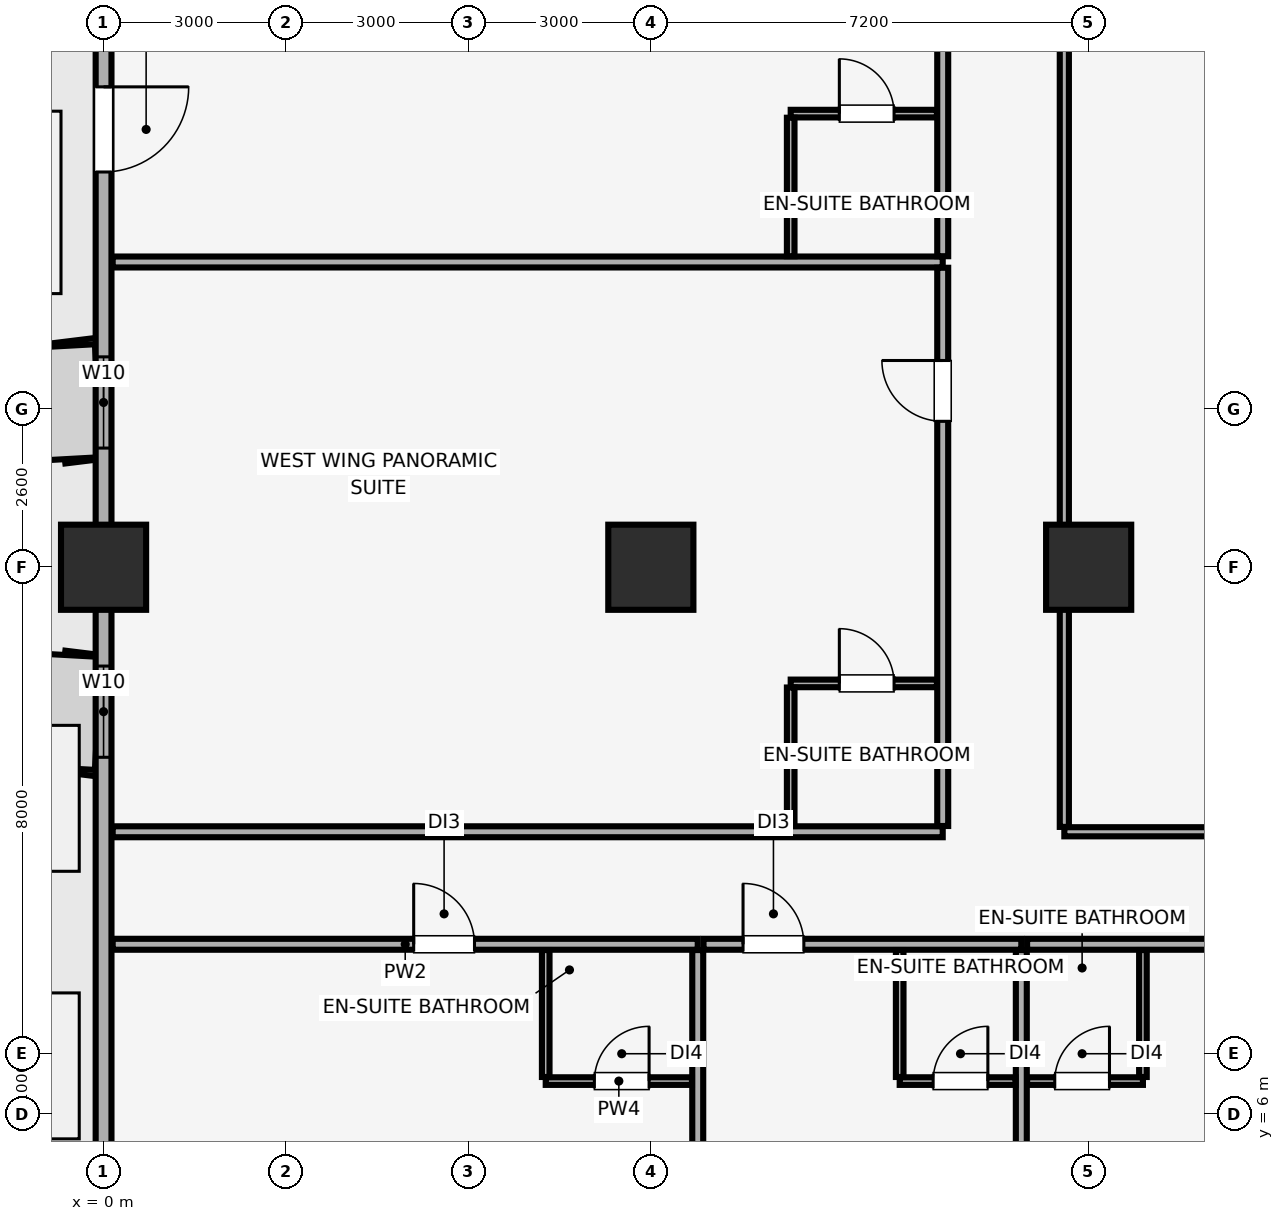
"""IFC4 building model, lengths in metres.
Left out: names, types, materials, properties, quantities, classifications, styles, units other than length and angle.
Written with IfcOpenShell. Run it as: python <this file> out.ifc"""

import sys

from ifc_helpers import new_model, si_unit, direction, frame, frame_2d, origin, origin_2d, place, context, subcontext, project, spatial, rectangle, extrude, element, fill, save


model = new_model("IFC4")
c1 = context("Model", 3, precision=1e-05, world=origin(), true_north=direction((0.0, 1.0)))
c2 = subcontext(c1, "Body", "Model", "MODEL_VIEW")
j1 = project(units=[si_unit("LENGTHUNIT", "METRE"), si_unit("PLANEANGLEUNIT", "RADIAN")], contexts=[c1])
p1 = place(None, origin())
s1 = spatial("IfcSite", under=j1, at=p1, CompositionType="ELEMENT")
p2 = place(p1, origin())
s2 = spatial("IfcBuilding", under=s1, at=p2, CompositionType="ELEMENT")
p3 = place(p2, frame((0.0, 0.0, 31.4)))
s3 = spatial("IfcBuildingStorey", under=s2, at=p3, CompositionType="ELEMENT", Elevation=31.4)
for number, where, z_axis, x_axis in (
    (1, (0.0, 15.0, 0.0), (0.0, 0.0, 1.0), (1.0, 0.0, 0.0)),
    (2, (9.0, 15.0, 0.0), (0.0, 0.0, 1.0), (1.0, 0.0, 0.0)),
    (3, (16.2, 15.0, 0.0), (0.0, 0.0, 1.0), (1.0, 0.0, 0.0)),
):
    element("IfcColumn", number, at=place(p3, frame(where, z_axis=z_axis, x_axis=x_axis)), inside=s3, PredefinedType="COLUMN", context=c2, shape_type="SweptSolid", body=[
        extrude(rectangle(XDim=1.4, YDim=1.4, at=origin_2d()), origin(), (0.0, 0.0, 1.0), 3.51),
    ])
p4 = place(p3, frame((0.0, 44.8, 0.0), z_axis=(0.0, 0.0, 1.0), x_axis=(0.0, -1.0, 0.0)))
e4 = element("IfcWall", 4, at=p4, inside=s3, PredefinedType="SOLIDWALL", context=c2, shape_type="SweptSolid", body=[
    extrude(rectangle(XDim=40.6, YDim=0.26, at=frame_2d((20.3, 0.0))), origin(), (0.0, 0.0, 1.0), 2.56),
])
p5 = place(p4, frame((21.9, 0.0, 0.0)))
e5 = element("IfcOpeningElement", 5, at=p5, cuts=e4, PredefinedType="OPENING", context=c2, shape_type="SweptSolid", body=[
    extrude(rectangle(XDim=1.4, YDim=2.2, at=frame_2d((0.7, 1.1))), frame((0.0, 0.14, 0.0), z_axis=(0.0, -1.0, 0.0), x_axis=(1.0, 0.0, 0.0)), (0.0, 0.0, 1.0), 0.28),
])
p6 = place(p4, frame((31.425, 0.0, 0.85)))
e6 = element("IfcOpeningElement", 6, at=p6, cuts=e4, PredefinedType="OPENING", context=c2, shape_type="SweptSolid", body=[
    extrude(rectangle(XDim=1.5, YDim=1.4, at=frame_2d((0.75, 0.7))), frame((0.0, 0.14, 0.0), z_axis=(0.0, -1.0, 0.0), x_axis=(1.0, 0.0, 0.0)), (0.0, 0.0, 1.0), 0.28),
])
p7 = place(p4, frame((26.34, 0.0, 0.85)))
e7 = element("IfcOpeningElement", 7, at=p7, cuts=e4, PredefinedType="OPENING", context=c2, shape_type="SweptSolid", body=[
    extrude(rectangle(XDim=1.5, YDim=1.4, at=frame_2d((0.75, 0.7))), frame((0.0, 0.14, 0.0), z_axis=(0.0, -1.0, 0.0), x_axis=(1.0, 0.0, 0.0)), (0.0, 0.0, 1.0), 0.28),
])
p8 = place(p4, frame((17.99, 0.0, 0.85)))
e8 = element("IfcOpeningElement", 8, at=p8, cuts=e4, PredefinedType="OPENING", context=c2, shape_type="SweptSolid", body=[
    extrude(rectangle(XDim=1.5, YDim=1.4, at=frame_2d((0.75, 0.7))), frame((0.0, 0.14, 0.0), z_axis=(0.0, -1.0, 0.0), x_axis=(1.0, 0.0, 0.0)), (0.0, 0.0, 1.0), 0.28),
])
p9 = place(p4, frame((11.05, 0.0, 0.85)))
e9 = element("IfcOpeningElement", 9, at=p9, cuts=e4, PredefinedType="OPENING", context=c2, shape_type="SweptSolid", body=[
    extrude(rectangle(XDim=1.5, YDim=1.4, at=frame_2d((0.75, 0.7))), frame((0.0, 0.14, 0.0), z_axis=(0.0, -1.0, 0.0), x_axis=(1.0, 0.0, 0.0)), (0.0, 0.0, 1.0), 0.28),
])
p10 = place(p4, frame((6.35, 0.0, 0.85)))
e10 = element("IfcOpeningElement", 10, at=p10, cuts=e4, PredefinedType="OPENING", context=c2, shape_type="SweptSolid", body=[
    extrude(rectangle(XDim=1.5, YDim=1.4, at=frame_2d((0.75, 0.7))), frame((0.0, 0.14, 0.0), z_axis=(0.0, -1.0, 0.0), x_axis=(1.0, 0.0, 0.0)), (0.0, 0.0, 1.0), 0.28),
])
p11 = place(p4, frame((1.735, 0.0, 0.85)))
e11 = element("IfcOpeningElement", 11, at=p11, cuts=e4, PredefinedType="OPENING", context=c2, shape_type="SweptSolid", body=[
    extrude(rectangle(XDim=1.5, YDim=1.4, at=frame_2d((0.75, 0.7))), frame((0.0, 0.14, 0.0), z_axis=(0.0, -1.0, 0.0), x_axis=(1.0, 0.0, 0.0)), (0.0, 0.0, 1.0), 0.28),
])
p12 = place(p3, frame((0.15, 8.8, 0.0), z_axis=(0.0, 0.0, 1.0), x_axis=(1.0, 0.0, 0.0)))
e12 = element("IfcWall", 12, at=p12, inside=s3, PredefinedType="PARTITIONING", context=c2, shape_type="SweptSolid", body=[
    extrude(rectangle(XDim=9.621, YDim=0.18, at=frame_2d((4.811, 0.0))), origin(), (0.0, 0.0, 1.0), 3.51),
])
p13 = place(p12, frame((4.95, 0.0, 0.0)))
e13 = element("IfcOpeningElement", 13, at=p13, cuts=e12, PredefinedType="OPENING", context=c2, shape_type="SweptSolid", body=[
    extrude(rectangle(XDim=1.0, YDim=2.15, at=frame_2d((0.5, 1.075))), frame((0.0, 0.1, 0.0), z_axis=(0.0, -1.0, 0.0), x_axis=(1.0, 0.0, 0.0)), (0.0, 0.0, 1.0), 0.2),
])
p14 = place(p3, frame((9.771, 0.15, 0.0), z_axis=(0.0, 0.0, 1.0), x_axis=(0.0, 1.0, 0.0)))
e14 = element("IfcWall", 14, at=p14, inside=s3, PredefinedType="PARTITIONING", context=c2, shape_type="SweptSolid", body=[
    extrude(rectangle(XDim=8.555, YDim=0.18, at=frame_2d((4.278, 0.0))), origin(), (0.0, 0.0, 1.0), 2.88),
])
p15 = place(p3, frame((7.271, 6.55, 0.0), z_axis=(0.0, 0.0, 1.0), x_axis=(1.0, 0.0, 0.0)))
e15 = element("IfcWall", 15, at=p15, inside=s3, PredefinedType="PARTITIONING", context=c2, shape_type="SweptSolid", body=[
    extrude(rectangle(XDim=2.405, YDim=0.125, at=frame_2d((1.203, 0.0))), origin(), (0.0, 0.0, 1.0), 3.51),
])
p16 = place(p15, frame((0.8, 0.0, 0.0)))
e16 = element("IfcOpeningElement", 16, at=p16, cuts=e15, PredefinedType="OPENING", context=c2, shape_type="SweptSolid", body=[
    extrude(rectangle(XDim=0.9, YDim=2.1, at=frame_2d((0.45, 1.05))), frame((0.0, 0.073, 0.0), z_axis=(0.0, -1.0, 0.0), x_axis=(1.0, 0.0, 0.0)), (0.0, 0.0, 1.0), 0.145),
])
p17 = place(p3, frame((7.271, 6.617, 0.0), z_axis=(0.0, 0.0, 1.0), x_axis=(0.0, 1.0, 0.0)))
e17 = element("IfcWall", 17, at=p17, inside=s3, PredefinedType="PARTITIONING", context=c2, shape_type="SweptSolid", body=[
    extrude(rectangle(XDim=2.088, YDim=0.125, at=frame_2d((1.044, 0.0))), origin(), (0.0, 0.0, 1.0), 3.51),
])
p18 = place(p3, frame((9.866, 8.8, 0.0), z_axis=(0.0, 0.0, 1.0), x_axis=(1.0, 0.0, 0.0)))
e18 = element("IfcWall", 18, at=p18, inside=s3, PredefinedType="PARTITIONING", context=c2, shape_type="SweptSolid", body=[
    extrude(rectangle(XDim=5.226, YDim=0.18, at=frame_2d((2.613, 0.0))), origin(), (0.0, 0.0, 1.0), 3.51),
])
p19 = place(p18, frame((0.65, 0.0, 0.0)))
e19 = element("IfcOpeningElement", 19, at=p19, cuts=e18, PredefinedType="OPENING", context=c2, shape_type="SweptSolid", body=[
    extrude(rectangle(XDim=1.0, YDim=2.15, at=frame_2d((0.5, 1.075))), frame((0.0, 0.1, 0.0), z_axis=(0.0, -1.0, 0.0), x_axis=(1.0, 0.0, 0.0)), (0.0, 0.0, 1.0), 0.2),
])
p20 = place(p3, frame((15.093, 0.15, 0.0), z_axis=(0.0, 0.0, 1.0), x_axis=(0.0, 1.0, 0.0)))
e20 = element("IfcWall", 20, at=p20, inside=s3, PredefinedType="PARTITIONING", context=c2, shape_type="SweptSolid", body=[
    extrude(rectangle(XDim=8.555, YDim=0.18, at=frame_2d((4.278, 0.0))), origin(), (0.0, 0.0, 1.0), 3.51),
])
p21 = place(p3, frame((13.093, 6.55, 0.0), z_axis=(0.0, 0.0, 1.0), x_axis=(1.0, 0.0, 0.0)))
e21 = element("IfcWall", 21, at=p21, inside=s3, PredefinedType="PARTITIONING", context=c2, shape_type="SweptSolid", body=[
    extrude(rectangle(XDim=1.905, YDim=0.125, at=frame_2d((0.953, 0.0))), origin(), (0.0, 0.0, 1.0), 3.51),
])
p22 = place(p21, frame((0.55, 0.0, 0.0)))
e22 = element("IfcOpeningElement", 22, at=p22, cuts=e21, PredefinedType="OPENING", context=c2, shape_type="SweptSolid", body=[
    extrude(rectangle(XDim=0.9, YDim=2.1, at=frame_2d((0.45, 1.05))), frame((0.0, 0.073, 0.0), z_axis=(0.0, -1.0, 0.0), x_axis=(1.0, 0.0, 0.0)), (0.0, 0.0, 1.0), 0.145),
])
p23 = place(p3, frame((13.093, 6.617, 0.0), z_axis=(0.0, 0.0, 1.0), x_axis=(0.0, 1.0, 0.0)))
e23 = element("IfcWall", 23, at=p23, inside=s3, PredefinedType="PARTITIONING", context=c2, shape_type="SweptSolid", body=[
    extrude(rectangle(XDim=2.088, YDim=0.125, at=frame_2d((1.044, 0.0))), origin(), (0.0, 0.0, 1.0), 3.51),
])
p24 = place(p3, frame((15.188, 8.8, 0.0), z_axis=(0.0, 0.0, 1.0), x_axis=(1.0, 0.0, 0.0)))
e24 = element("IfcWall", 24, at=p24, inside=s3, PredefinedType="PARTITIONING", context=c2, shape_type="SweptSolid", body=[
    extrude(rectangle(XDim=5.226, YDim=0.18, at=frame_2d((2.613, 0.0))), origin(), (0.0, 0.0, 1.0), 3.51),
])
p25 = place(p24, frame((3.516, 0.0, 0.0)))
e25 = element("IfcOpeningElement", 25, at=p25, cuts=e24, PredefinedType="OPENING", context=c2, shape_type="SweptSolid", body=[
    extrude(rectangle(XDim=1.0, YDim=2.15, at=frame_2d((0.5, 1.075))), frame((0.0, 0.1, 0.0), z_axis=(0.0, -1.0, 0.0), x_axis=(1.0, 0.0, 0.0)), (0.0, 0.0, 1.0), 0.2),
])
p26 = place(p3, frame((15.188, 6.55, 0.0), z_axis=(0.0, 0.0, 1.0), x_axis=(1.0, 0.0, 0.0)))
e26 = element("IfcWall", 26, at=p26, inside=s3, PredefinedType="PARTITIONING", context=c2, shape_type="SweptSolid", body=[
    extrude(rectangle(XDim=1.905, YDim=0.125, at=frame_2d((0.953, 0.0))), origin(), (0.0, 0.0, 1.0), 3.51),
])
p27 = place(p26, frame((0.455, 0.0, 0.0)))
e27 = element("IfcOpeningElement", 27, at=p27, cuts=e26, PredefinedType="OPENING", context=c2, shape_type="SweptSolid", body=[
    extrude(rectangle(XDim=0.9, YDim=2.1, at=frame_2d((0.45, 1.05))), frame((0.0, 0.073, 0.0), z_axis=(0.0, -1.0, 0.0), x_axis=(1.0, 0.0, 0.0)), (0.0, 0.0, 1.0), 0.145),
])
p28 = place(p3, frame((17.093, 6.617, 0.0), z_axis=(0.0, 0.0, 1.0), x_axis=(0.0, 1.0, 0.0)))
e28 = element("IfcWall", 28, at=p28, inside=s3, PredefinedType="PARTITIONING", context=c2, shape_type="SweptSolid", body=[
    extrude(rectangle(XDim=2.088, YDim=0.125, at=frame_2d((1.044, 0.0))), origin(), (0.0, 0.0, 1.0), 3.51),
])
p29 = place(p3, frame((15.8, 10.65, 0.0), z_axis=(0.0, 0.0, 1.0), x_axis=(1.0, 0.0, 0.0)))
e29 = element("IfcWall", 29, at=p29, inside=s3, PredefinedType="PARTITIONING", context=c2, shape_type="SweptSolid", body=[
    extrude(rectangle(XDim=9.4, YDim=0.15, at=frame_2d((4.7, 0.0))), origin(), (0.0, 0.0, 1.0), 3.51),
])
p30 = place(p29, frame((4.2, 0.0, 0.0)))
e30 = element("IfcOpeningElement", 30, at=p30, cuts=e29, PredefinedType="OPENING", context=c2, shape_type="SweptSolid", body=[
    extrude(rectangle(XDim=1.0, YDim=2.15, at=frame_2d((0.5, 1.075))), frame((0.0, 0.085, 0.0), z_axis=(0.0, -1.0, 0.0), x_axis=(1.0, 0.0, 0.0)), (0.0, 0.0, 1.0), 0.17),
])
p31 = place(p3, frame((15.8, 10.73, 0.0), z_axis=(0.0, 0.0, 1.0), x_axis=(0.0, 1.0, 0.0)))
e31 = element("IfcWall", 31, at=p31, inside=s3, PredefinedType="PARTITIONING", context=c2, shape_type="SweptSolid", body=[
    extrude(rectangle(XDim=18.66, YDim=0.15, at=frame_2d((9.33, 0.0))), origin(), (0.0, 0.0, 1.0), 3.51),
])
for number, where, z_axis, x_axis in (
    (32, (0.15, 10.65, 0.0), (0.0, 0.0, 1.0), (1.0, 0.0, 0.0)),
    (33, (0.15, 20.02, 0.0), (0.0, 0.0, 1.0), (1.0, 0.0, 0.0)),
):
    element("IfcWall", number, at=place(p3, frame(where, z_axis=z_axis, x_axis=x_axis)), inside=s3, PredefinedType="PARTITIONING", context=c2, shape_type="SweptSolid", body=[
        extrude(rectangle(XDim=13.65, YDim=0.18, at=frame_2d((6.825, 0.0))), origin(), (0.0, 0.0, 1.0), 3.51),
    ])
p32 = place(p3, frame((13.8, 10.745, 0.0), z_axis=(0.0, 0.0, 1.0), x_axis=(0.0, 1.0, 0.0)))
e34 = element("IfcWall", 34, at=p32, inside=s3, PredefinedType="PARTITIONING", context=c2, shape_type="SweptSolid", body=[
    extrude(rectangle(XDim=9.18, YDim=0.18, at=frame_2d((4.59, 0.0))), origin(), (0.0, 0.0, 1.0), 3.51),
])
p33 = place(p32, frame((6.655, 0.0, 0.0)))
e35 = element("IfcOpeningElement", 35, at=p33, cuts=e34, PredefinedType="OPENING", context=c2, shape_type="SweptSolid", body=[
    extrude(rectangle(XDim=1.0, YDim=2.15, at=frame_2d((0.5, 1.075))), frame((0.0, 0.1, 0.0), z_axis=(0.0, -1.0, 0.0), x_axis=(1.0, 0.0, 0.0)), (0.0, 0.0, 1.0), 0.2),
])
p34 = place(p3, frame((11.3, 13.09, 0.0), z_axis=(0.0, 0.0, 1.0), x_axis=(1.0, 0.0, 0.0)))
e36 = element("IfcWall", 36, at=p34, inside=s3, PredefinedType="PARTITIONING", context=c2, shape_type="SweptSolid", body=[
    extrude(rectangle(XDim=2.405, YDim=0.125, at=frame_2d((1.203, 0.0))), origin(), (0.0, 0.0, 1.0), 3.51),
])
p35 = place(p34, frame((0.8, 0.0, 0.0)))
e37 = element("IfcOpeningElement", 37, at=p35, cuts=e36, PredefinedType="OPENING", context=c2, shape_type="SweptSolid", body=[
    extrude(rectangle(XDim=0.9, YDim=2.1, at=frame_2d((0.45, 1.05))), frame((0.0, 0.073, 0.0), z_axis=(0.0, -1.0, 0.0), x_axis=(1.0, 0.0, 0.0)), (0.0, 0.0, 1.0), 0.145),
])
p36 = place(p3, frame((11.3, 10.745, 0.0), z_axis=(0.0, 0.0, 1.0), x_axis=(0.0, 1.0, 0.0)))
e38 = element("IfcWall", 38, at=p36, inside=s3, PredefinedType="PARTITIONING", context=c2, shape_type="SweptSolid", body=[
    extrude(rectangle(XDim=2.277, YDim=0.125, at=frame_2d((1.139, 0.0))), origin(), (0.0, 0.0, 1.0), 3.51),
])
p37 = place(p3, frame((13.8, 20.115, 0.0), z_axis=(0.0, 0.0, 1.0), x_axis=(0.0, 1.0, 0.0)))
e39 = element("IfcWall", 39, at=p37, inside=s3, PredefinedType="PARTITIONING", context=c2, shape_type="SweptSolid", body=[
    extrude(rectangle(XDim=9.19, YDim=0.18, at=frame_2d((4.595, 0.0))), origin(), (0.0, 0.0, 1.0), 3.51),
])
p38 = place(p37, frame((5.375, 0.0, 0.0)))
e40 = element("IfcOpeningElement", 40, at=p38, cuts=e39, PredefinedType="OPENING", context=c2, shape_type="SweptSolid", body=[
    extrude(rectangle(XDim=1.0, YDim=2.15, at=frame_2d((0.5, 1.075))), frame((0.0, 0.1, 0.0), z_axis=(0.0, -1.0, 0.0), x_axis=(1.0, 0.0, 0.0)), (0.0, 0.0, 1.0), 0.2),
])
p39 = place(p3, frame((11.3, 22.46, 0.0), z_axis=(0.0, 0.0, 1.0), x_axis=(1.0, 0.0, 0.0)))
e41 = element("IfcWall", 41, at=p39, inside=s3, PredefinedType="PARTITIONING", context=c2, shape_type="SweptSolid", body=[
    extrude(rectangle(XDim=2.405, YDim=0.125, at=frame_2d((1.203, 0.0))), origin(), (0.0, 0.0, 1.0), 3.51),
])
p40 = place(p39, frame((0.8, 0.0, 0.0)))
e42 = element("IfcOpeningElement", 42, at=p40, cuts=e41, PredefinedType="OPENING", context=c2, shape_type="SweptSolid", body=[
    extrude(rectangle(XDim=0.9, YDim=2.1, at=frame_2d((0.45, 1.05))), frame((0.0, 0.073, 0.0), z_axis=(0.0, -1.0, 0.0), x_axis=(1.0, 0.0, 0.0)), (0.0, 0.0, 1.0), 0.145),
])
p41 = place(p3, frame((11.3, 20.115, 0.0), z_axis=(0.0, 0.0, 1.0), x_axis=(0.0, 1.0, 0.0)))
e43 = element("IfcWall", 43, at=p41, inside=s3, PredefinedType="PARTITIONING", context=c2, shape_type="SweptSolid", body=[
    extrude(rectangle(XDim=2.278, YDim=0.125, at=frame_2d((1.139, 0.0))), origin(), (0.0, 0.0, 1.0), 3.51),
])
p42 = place(p3, frame((0.0, 0.0, -0.28)))
p43 = place(p42, frame((-1.6, 21.0, 0.23)))
e44 = element("IfcWindow", 44, at=p43, inside=s3, PartitioningType="SINGLE_PANEL", PredefinedType="SKYLIGHT", context=c2, shape_type="SweptSolid", body=[
    extrude(rectangle(XDim=1.8, YDim=3.0, at=origin_2d()), origin(), (0.0, 0.0, 1.0), 0.05),
])
p44 = place(p42, frame((-1.6, 6.8, 0.23)))
e45 = element("IfcWindow", 45, at=p44, inside=s3, PartitioningType="SINGLE_PANEL", PredefinedType="SKYLIGHT", context=c2, shape_type="SweptSolid", body=[
    extrude(rectangle(XDim=2.4, YDim=2.4, at=origin_2d()), origin(), (0.0, 0.0, 1.0), 0.05),
])
p45 = place(p42, frame((-1.6, 11.2, 0.23)))
e46 = element("IfcWindow", 46, at=p45, inside=s3, PartitioningType="SINGLE_PANEL", PredefinedType="SKYLIGHT", context=c2, shape_type="SweptSolid", body=[
    extrude(rectangle(XDim=2.4, YDim=2.4, at=origin_2d()), origin(), (0.0, 0.0, 1.0), 0.05),
])
p46 = place(p5, origin())
e47 = element("IfcDoor", 47, at=p46, inside=s3, OperationType="SINGLE_SWING_LEFT", PredefinedType="DOOR", context=c2, shape_type="SweptSolid", body=[
    extrude(rectangle(XDim=1.4, YDim=2.2, at=frame_2d((0.7, 1.1))), frame((0.0, 0.025, 0.0), z_axis=(0.0, -1.0, 0.0), x_axis=(1.0, 0.0, 0.0)), (0.0, 0.0, 1.0), 0.05),
])
fill(e5, e47)
p47 = place(p6, origin())
e48 = element("IfcWindow", 48, at=p47, inside=s3, PartitioningType="SINGLE_PANEL", PredefinedType="WINDOW", context=c2, shape_type="SweptSolid", body=[
    extrude(rectangle(XDim=1.5, YDim=1.4, at=frame_2d((0.75, 0.7))), frame((0.0, 0.03, 0.0), z_axis=(0.0, -1.0, 0.0), x_axis=(1.0, 0.0, 0.0)), (0.0, 0.0, 1.0), 0.06),
])
fill(e6, e48)
p48 = place(p7, origin())
e49 = element("IfcWindow", 49, at=p48, inside=s3, PartitioningType="SINGLE_PANEL", PredefinedType="WINDOW", context=c2, shape_type="SweptSolid", body=[
    extrude(rectangle(XDim=1.5, YDim=1.4, at=frame_2d((0.75, 0.7))), frame((0.0, 0.03, 0.0), z_axis=(0.0, -1.0, 0.0), x_axis=(1.0, 0.0, 0.0)), (0.0, 0.0, 1.0), 0.06),
])
fill(e7, e49)
p49 = place(p13, origin())
e50 = element("IfcDoor", 50, at=p49, inside=s3, OperationType="SINGLE_SWING_LEFT", PredefinedType="DOOR", context=c2, shape_type="SweptSolid", body=[
    extrude(rectangle(XDim=1.0, YDim=2.15, at=frame_2d((0.5, 1.075))), frame((0.0, 0.025, 0.0), z_axis=(0.0, -1.0, 0.0), x_axis=(1.0, 0.0, 0.0)), (0.0, 0.0, 1.0), 0.05),
])
fill(e13, e50)
p50 = place(p16, origin())
e51 = element("IfcDoor", 51, at=p50, inside=s3, OperationType="SINGLE_SWING_RIGHT", PredefinedType="DOOR", context=c2, shape_type="SweptSolid", body=[
    extrude(rectangle(XDim=0.9, YDim=2.1, at=frame_2d((0.45, 1.05))), frame((0.0, 0.025, 0.0), z_axis=(0.0, -1.0, 0.0), x_axis=(1.0, 0.0, 0.0)), (0.0, 0.0, 1.0), 0.05),
])
fill(e16, e51)
p51 = place(p19, origin())
e52 = element("IfcDoor", 52, at=p51, inside=s3, OperationType="SINGLE_SWING_LEFT", PredefinedType="DOOR", context=c2, shape_type="SweptSolid", body=[
    extrude(rectangle(XDim=1.0, YDim=2.15, at=frame_2d((0.5, 1.075))), frame((0.0, 0.025, 0.0), z_axis=(0.0, -1.0, 0.0), x_axis=(1.0, 0.0, 0.0)), (0.0, 0.0, 1.0), 0.05),
])
fill(e19, e52)
p52 = place(p22, origin())
e53 = element("IfcDoor", 53, at=p52, inside=s3, OperationType="SINGLE_SWING_RIGHT", PredefinedType="DOOR", context=c2, shape_type="SweptSolid", body=[
    extrude(rectangle(XDim=0.9, YDim=2.1, at=frame_2d((0.45, 1.05))), frame((0.0, 0.025, 0.0), z_axis=(0.0, -1.0, 0.0), x_axis=(1.0, 0.0, 0.0)), (0.0, 0.0, 1.0), 0.05),
])
fill(e22, e53)
p53 = place(p27, origin())
e54 = element("IfcDoor", 54, at=p53, inside=s3, OperationType="SINGLE_SWING_RIGHT", PredefinedType="DOOR", context=c2, shape_type="SweptSolid", body=[
    extrude(rectangle(XDim=0.9, YDim=2.1, at=frame_2d((0.45, 1.05))), frame((0.0, 0.025, 0.0), z_axis=(0.0, -1.0, 0.0), x_axis=(1.0, 0.0, 0.0)), (0.0, 0.0, 1.0), 0.05),
])
fill(e27, e54)
p54 = place(p33, origin())
e55 = element("IfcDoor", 55, at=p54, inside=s3, OperationType="SINGLE_SWING_RIGHT", PredefinedType="DOOR", context=c2, shape_type="SweptSolid", body=[
    extrude(rectangle(XDim=1.0, YDim=2.15, at=frame_2d((0.5, 1.075))), frame((0.0, 0.025, 0.0), z_axis=(0.0, -1.0, 0.0), x_axis=(1.0, 0.0, 0.0)), (0.0, 0.0, 1.0), 0.05),
])
fill(e35, e55)
p55 = place(p35, origin())
e56 = element("IfcDoor", 56, at=p55, inside=s3, OperationType="SINGLE_SWING_LEFT", PredefinedType="DOOR", context=c2, shape_type="SweptSolid", body=[
    extrude(rectangle(XDim=0.9, YDim=2.1, at=frame_2d((0.45, 1.05))), frame((0.0, 0.025, 0.0), z_axis=(0.0, -1.0, 0.0), x_axis=(1.0, 0.0, 0.0)), (0.0, 0.0, 1.0), 0.05),
])
fill(e37, e56)
p56 = place(p40, origin())
e57 = element("IfcDoor", 57, at=p56, inside=s3, OperationType="SINGLE_SWING_LEFT", PredefinedType="DOOR", context=c2, shape_type="SweptSolid", body=[
    extrude(rectangle(XDim=0.9, YDim=2.1, at=frame_2d((0.45, 1.05))), frame((0.0, 0.025, 0.0), z_axis=(0.0, -1.0, 0.0), x_axis=(1.0, 0.0, 0.0)), (0.0, 0.0, 1.0), 0.05),
])
fill(e42, e57)
save(model, sys.argv[1])
